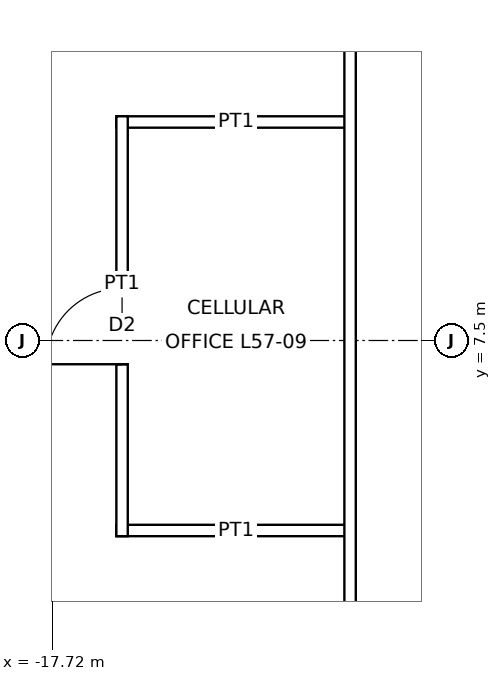
"""IFC4 building model, lengths in metres.
Left out: names, types, materials, properties, quantities, classifications, styles, units other than length and angle.
Written with IfcOpenShell. Run it as: python <this file> out.ifc"""

import sys

from ifc_helpers import new_model, si_unit, direction, frame, frame_2d, origin, place, context, subcontext, project, spatial, rectangle, extrude, element, fill, save


model = new_model("IFC4")
c1 = context("Model", 3, precision=1e-05, world=origin(), true_north=direction((0.0, 1.0)))
c2 = subcontext(c1, "Body", "Model", "MODEL_VIEW")
j1 = project(units=[si_unit("LENGTHUNIT", "METRE"), si_unit("PLANEANGLEUNIT", "RADIAN")], contexts=[c1])
p1 = place(None, origin())
s1 = spatial("IfcSite", under=j1, at=p1, CompositionType="ELEMENT")
p2 = place(p1, origin())
s2 = spatial("IfcBuilding", under=s1, at=p2, CompositionType="ELEMENT")
p3 = place(p2, frame((0.0, 0.0, 263.9)))
s3 = spatial("IfcBuildingStorey", under=s2, at=p3, CompositionType="ELEMENT", Elevation=263.9)
for number, where, z_axis, x_axis in (
    (1, (-16.875, 5.0, 0.0), (0.0, 0.0, 1.0), (1.0, 0.0, 0.0)),
    (2, (-16.875, 10.375, 0.0), (0.0, 0.0, 1.0), (1.0, 0.0, 0.0)),
):
    element("IfcWall", number, at=place(p3, frame(where, z_axis=z_axis, x_axis=x_axis)), inside=s3, PredefinedType="PARTITIONING", context=c2, shape_type="SweptSolid", body=[
        extrude(rectangle(XDim=3.15, YDim=0.15, at=frame_2d((1.575, 0.0))), origin(), (0.0, 0.0, 1.0), 3.85),
    ])
p4 = place(p3, frame((-16.8, 4.925, 0.0), z_axis=(0.0, 0.0, 1.0), x_axis=(0.0, 1.0, 0.0)))
e3 = element("IfcWall", 3, at=p4, inside=s3, PredefinedType="PARTITIONING", context=c2, shape_type="SweptSolid", body=[
    extrude(rectangle(XDim=5.525, YDim=0.15, at=frame_2d((2.762, 0.0))), origin(), (0.0, 0.0, 1.0), 3.85),
])
p5 = place(p4, frame((2.262, 0.0, 0.0)))
e4 = element("IfcOpeningElement", 4, at=p5, cuts=e3, PredefinedType="OPENING", context=c2, shape_type="SweptSolid", body=[
    extrude(rectangle(XDim=1.0, YDim=2.1, at=frame_2d((0.5, 1.05))), frame((0.0, 0.085, 0.0), z_axis=(0.0, -1.0, 0.0), x_axis=(1.0, 0.0, 0.0)), (0.0, 0.0, 1.0), 0.17),
])
p6 = place(p3, frame((-13.8, -13.875, 0.0), z_axis=(0.0, 0.0, 1.0), x_axis=(0.0, 1.0, 0.0)))
e5 = element("IfcWall", 5, at=p6, inside=s3, PredefinedType="PARTITIONING", context=c2, shape_type="SweptSolid", body=[
    extrude(rectangle(XDim=27.75, YDim=0.15, at=frame_2d((13.875, 0.0))), origin(), (0.0, 0.0, 1.0), 3.85),
])
p7 = place(p5, origin())
e6 = element("IfcDoor", 6, at=p7, inside=s3, OperationType="SINGLE_SWING_LEFT", PredefinedType="DOOR", context=c2, shape_type="SweptSolid", body=[
    extrude(rectangle(XDim=1.0, YDim=2.1, at=frame_2d((0.5, 1.05))), frame((0.0, 0.025, 0.0), z_axis=(0.0, -1.0, 0.0), x_axis=(1.0, 0.0, 0.0)), (0.0, 0.0, 1.0), 0.05),
])
fill(e4, e6)
save(model, sys.argv[1])
